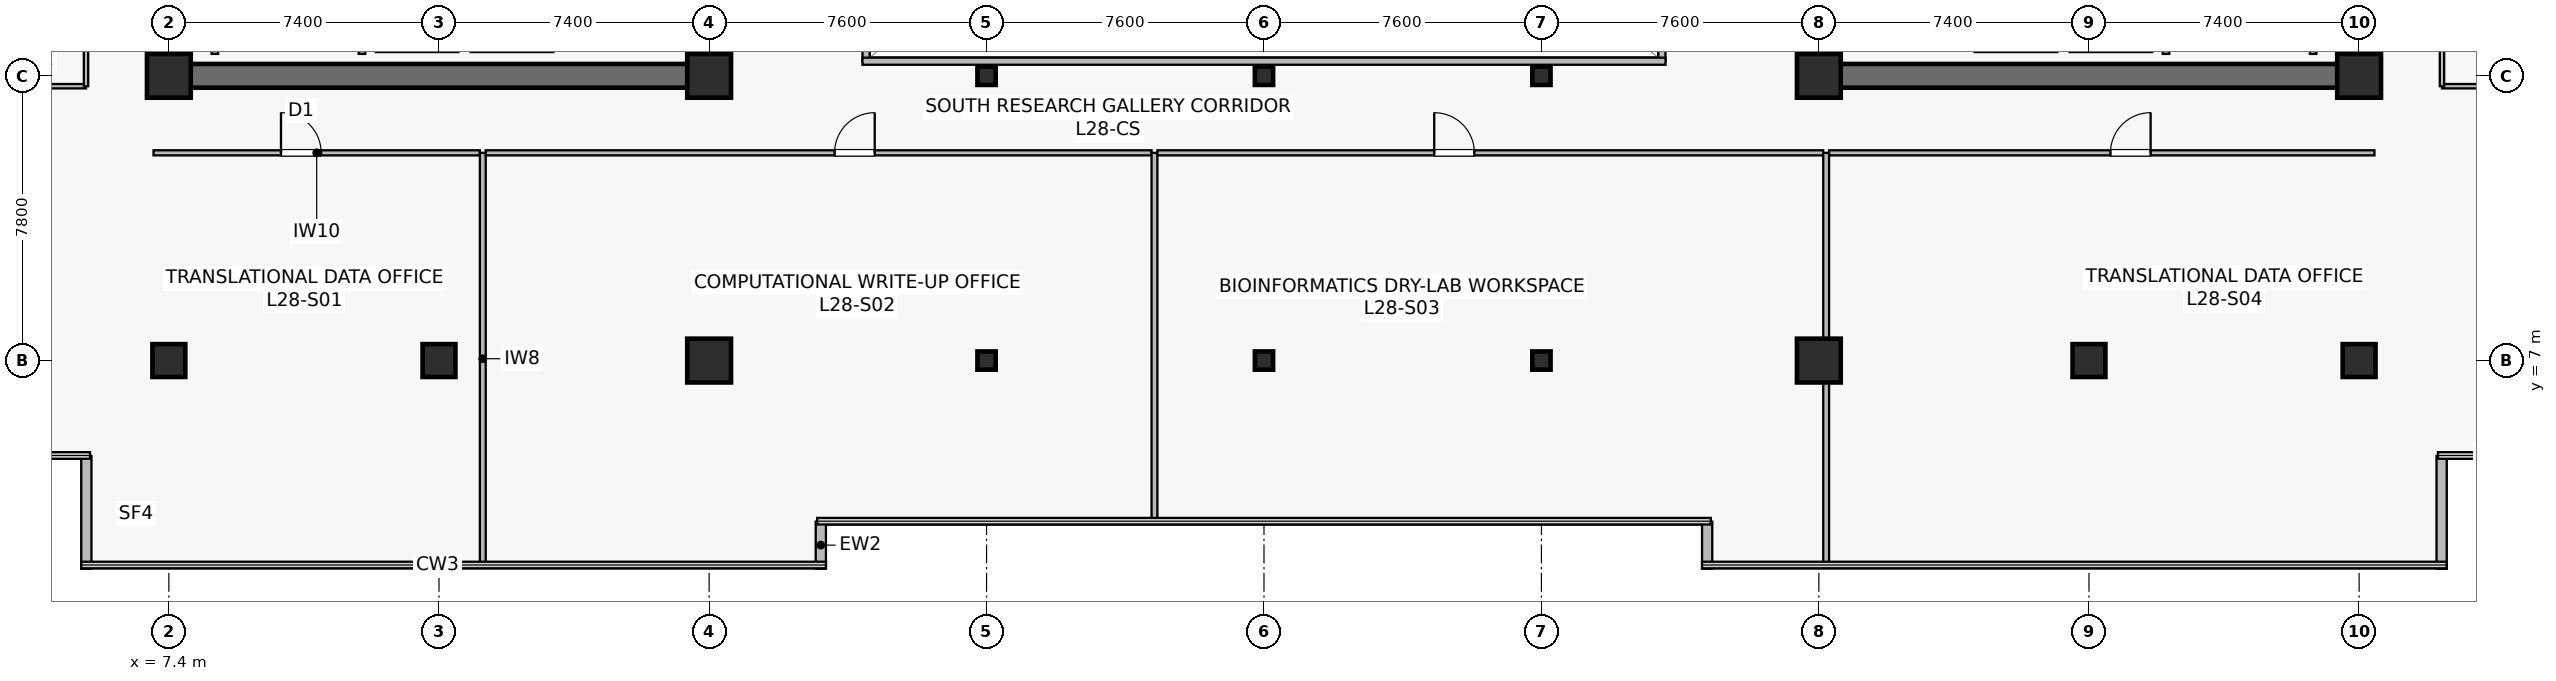
"""IFC4 building model, lengths in metres.
Left out: names, types, materials, properties, quantities, classifications, styles, units other than length and angle.
Written with IfcOpenShell. Run it as: python <this file> out.ifc"""

import sys

from ifc_helpers import new_model, si_unit, direction, frame, frame_2d, origin, origin_2d, place, context, subcontext, project, spatial, rectangle, hollow_rectangle, extrude, source, transform, mapped, element, fill, save


model = new_model("IFC4")
c1 = context("Model", 3, precision=1e-05, world=origin(), true_north=direction((0.0, 1.0)))
c2 = subcontext(c1, "Body", "Model", "MODEL_VIEW")
j1 = project(units=[si_unit("LENGTHUNIT", "METRE"), si_unit("PLANEANGLEUNIT", "RADIAN")], contexts=[c1])
p1 = place(None, origin())
s1 = spatial("IfcSite", under=j1, at=p1, CompositionType="ELEMENT")
p2 = place(p1, origin())
s2 = spatial("IfcBuilding", under=s1, at=p2, CompositionType="ELEMENT")
p3 = place(p2, frame((0.0, 0.0, 117.4)))
s3 = spatial("IfcBuildingStorey", under=s2, at=p3, CompositionType="ELEMENT", Elevation=117.4)
p4 = place(p3, frame((7.075, 14.8, 0.0), z_axis=(0.0, 0.0, 1.0), x_axis=(1.0, 0.0, 0.0)))
e1 = element("IfcWall", 1, at=p4, inside=s3, PredefinedType="SHEAR", context=c2, shape_type="SweptSolid", body=[
    extrude(rectangle(XDim=15.45, YDim=0.65, at=frame_2d((7.725, 0.0))), origin(), (0.0, 0.0, 1.0), 3.79),
])
p5 = place(p3, frame((7.4, 15.125, 0.0), z_axis=(0.0, 0.0, 1.0), x_axis=(0.0, 1.0, 0.0)))
e2 = element("IfcWall", 2, at=p5, inside=s3, PredefinedType="SHEAR", context=c2, shape_type="SweptSolid", body=[
    extrude(rectangle(XDim=18.35, YDim=0.65, at=frame_2d((9.175, 0.0))), origin(), (0.0, 0.0, 1.0), 3.79),
])
p6 = place(p3, frame((22.2, 15.125, 0.0), z_axis=(0.0, 0.0, 1.0), x_axis=(0.0, 1.0, 0.0)))
e3 = element("IfcWall", 3, at=p6, inside=s3, PredefinedType="SHEAR", context=c2, shape_type="SweptSolid", body=[
    extrude(rectangle(XDim=18.35, YDim=0.65, at=frame_2d((9.175, 0.0))), origin(), (0.0, 0.0, 1.0), 3.79),
])
p7 = place(p6, frame((3.425, 0.0, 0.0)))
e4 = element("IfcOpeningElement", 4, at=p7, cuts=e3, PredefinedType="OPENING", context=c2, shape_type="SweptSolid", body=[
    extrude(rectangle(XDim=1.42, YDim=2.2, at=frame_2d((0.71, 1.1))), frame((0.0, 0.335, 0.0), z_axis=(0.0, -1.0, 0.0), x_axis=(1.0, 0.0, 0.0)), (0.0, 0.0, 1.0), 0.67),
])
p8 = place(p3, frame((52.275, 14.8, 0.0), z_axis=(0.0, 0.0, 1.0), x_axis=(1.0, 0.0, 0.0)))
e5 = element("IfcWall", 5, at=p8, inside=s3, PredefinedType="SHEAR", context=c2, shape_type="SweptSolid", body=[
    extrude(rectangle(XDim=15.45, YDim=0.65, at=frame_2d((7.725, 0.0))), origin(), (0.0, 0.0, 1.0), 3.79),
])
p9 = place(p3, frame((52.6, 15.125, 0.0), z_axis=(0.0, 0.0, 1.0), x_axis=(0.0, 1.0, 0.0)))
e6 = element("IfcWall", 6, at=p9, inside=s3, PredefinedType="SHEAR", context=c2, shape_type="SweptSolid", body=[
    extrude(rectangle(XDim=18.35, YDim=0.65, at=frame_2d((9.175, 0.0))), origin(), (0.0, 0.0, 1.0), 3.79),
])
p10 = place(p9, frame((3.425, 0.0, 0.0)))
e7 = element("IfcOpeningElement", 7, at=p10, cuts=e6, PredefinedType="OPENING", context=c2, shape_type="SweptSolid", body=[
    extrude(rectangle(XDim=1.42, YDim=2.2, at=frame_2d((0.71, 1.1))), frame((0.0, 0.335, 0.0), z_axis=(0.0, -1.0, 0.0), x_axis=(1.0, 0.0, 0.0)), (0.0, 0.0, 1.0), 0.67),
])
p11 = place(p3, frame((67.4, 15.125, 0.0), z_axis=(0.0, 0.0, 1.0), x_axis=(0.0, 1.0, 0.0)))
e8 = element("IfcWall", 8, at=p11, inside=s3, PredefinedType="SHEAR", context=c2, shape_type="SweptSolid", body=[
    extrude(rectangle(XDim=18.35, YDim=0.65, at=frame_2d((9.175, 0.0))), origin(), (0.0, 0.0, 1.0), 3.79),
])
m1 = source(origin(), c2, "Body", "SweptSolid", [
    extrude(rectangle(XDim=0.9, YDim=0.9, at=origin_2d()), origin(), (0.0, 0.0, 1.0), 4.1),
])
p12 = place(p3, frame((14.8, 7.0, 0.0), z_axis=(0.0, 0.0, 1.0), x_axis=(1.0, 0.0, 0.0)))
e9 = element("IfcColumn", 9, at=p12, inside=s3, PredefinedType="COLUMN", context=c2, shape_type="MappedRepresentation", body=[
    mapped(m1, transform((0.0, 0.0, 0.0), scale=1.0)),
])
m2 = source(origin(), c2, "Body", "SweptSolid", [
    extrude(rectangle(XDim=1.2, YDim=1.2, at=origin_2d()), origin(), (0.0, 0.0, 1.0), 4.1),
])
for number, where, z_axis, x_axis in (
    (10, (22.2, 7.0, 0.0), (0.0, 0.0, 1.0), (1.0, 0.0, 0.0)),
    (11, (7.4, 14.8, 0.0), (0.0, 0.0, 1.0), (1.0, 0.0, 0.0)),
    (12, (22.2, 14.8, 0.0), (0.0, 0.0, 1.0), (1.0, 0.0, 0.0)),
    (13, (52.6, 7.0, 0.0), (0.0, 0.0, 1.0), (1.0, 0.0, 0.0)),
):
    element("IfcColumn", number, at=place(p3, frame(where, z_axis=z_axis, x_axis=x_axis)), inside=s3, PredefinedType="COLUMN", context=c2, shape_type="MappedRepresentation", body=[
        mapped(m2, transform((0.0, 0.0, 0.0), scale=1.0)),
    ])
p13 = place(p3, frame((60.0, 7.0, 0.0), z_axis=(0.0, 0.0, 1.0), x_axis=(1.0, 0.0, 0.0)))
e14 = element("IfcColumn", 14, at=p13, inside=s3, PredefinedType="COLUMN", context=c2, shape_type="MappedRepresentation", body=[
    mapped(m1, transform((0.0, 0.0, 0.0), scale=1.0)),
])
for number, where, z_axis, x_axis in (
    (15, (52.6, 14.8, 0.0), (0.0, 0.0, 1.0), (1.0, 0.0, 0.0)),
    (16, (67.4, 14.8, 0.0), (0.0, 0.0, 1.0), (1.0, 0.0, 0.0)),
):
    element("IfcColumn", number, at=place(p3, frame(where, z_axis=z_axis, x_axis=x_axis)), inside=s3, PredefinedType="COLUMN", context=c2, shape_type="MappedRepresentation", body=[
        mapped(m2, transform((0.0, 0.0, 0.0), scale=1.0)),
    ])
for number, where, z_axis, x_axis in (
    (17, (7.4, 7.0, 0.0), (0.0, 0.0, 1.0), (1.0, 0.0, 0.0)),
    (18, (67.4, 7.0, 0.0), (0.0, 0.0, 1.0), (1.0, 0.0, 0.0)),
):
    element("IfcColumn", number, at=place(p3, frame(where, z_axis=z_axis, x_axis=x_axis)), inside=s3, PredefinedType="COLUMN", context=c2, shape_type="MappedRepresentation", body=[
        mapped(m1, transform((0.0, 0.0, 0.0), scale=1.0)),
    ])
m3 = source(origin(), c2, "Body", "SweptSolid", [
    extrude(hollow_rectangle(XDim=0.5, YDim=0.5, WallThickness=0.022, at=origin_2d()), origin(), (0.0, 0.0, 1.0), 4.1),
])
for number, where, z_axis, x_axis in (
    (19, (29.8, 7.0, 0.0), (0.0, 0.0, 1.0), (1.0, 0.0, 0.0)),
    (20, (29.8, 14.8, 0.0), (0.0, 0.0, 1.0), (1.0, 0.0, 0.0)),
    (21, (37.4, 7.0, 0.0), (0.0, 0.0, 1.0), (1.0, 0.0, 0.0)),
    (22, (37.4, 14.8, 0.0), (0.0, 0.0, 1.0), (1.0, 0.0, 0.0)),
    (23, (45.0, 7.0, 0.0), (0.0, 0.0, 1.0), (1.0, 0.0, 0.0)),
    (24, (45.0, 14.8, 0.0), (0.0, 0.0, 1.0), (1.0, 0.0, 0.0)),
):
    element("IfcColumn", number, at=place(p3, frame(where, z_axis=z_axis, x_axis=x_axis)), inside=s3, PredefinedType="COLUMN", context=c2, shape_type="MappedRepresentation", body=[
        mapped(m3, transform((0.0, 0.0, 0.0), scale=1.0)),
    ])
for number, where, z_axis, x_axis in (
    (25, (25.26, 1.3, 0.0), (0.0, 0.0, 1.0), (0.0, 1.0, 0.0)),
    (26, (49.54, 2.588, 0.0), (0.0, 0.0, 1.0), (0.0, -1.0, 0.0)),
):
    element("IfcWall", number, at=place(p3, frame(where, z_axis=z_axis, x_axis=x_axis)), inside=s3, PredefinedType="STANDARD", context=c2, shape_type="SweptSolid", body=[
        extrude(rectangle(XDim=1.288, YDim=0.28, at=frame_2d((0.644, 0.0))), origin(), (0.0, 0.0, 1.0), 3.79),
    ])
for number, where, z_axis, x_axis in (
    (27, (69.66, 1.3, 0.0), (0.0, 0.0, 1.0), (0.0, 1.0, 0.0)),
    (28, (5.14, 4.388, 0.0), (0.0, 0.0, 1.0), (0.0, -1.0, 0.0)),
):
    element("IfcWall", number, at=place(p3, frame(where, z_axis=z_axis, x_axis=x_axis)), inside=s3, PredefinedType="STANDARD", context=c2, shape_type="SweptSolid", body=[
        extrude(rectangle(XDim=3.088, YDim=0.28, at=frame_2d((1.544, 0.0))), origin(), (0.0, 0.0, 1.0), 3.79),
    ])
p14 = place(p3, frame((13.07, 15.55, 0.0), z_axis=(0.0, 0.0, 1.0), x_axis=(1.0, 0.0, 0.0)))
e29 = element("IfcWall", 29, at=p14, inside=s3, PredefinedType="SOLIDWALL", context=c2, shape_type="SweptSolid", body=[
    extrude(rectangle(XDim=2.26, YDim=0.2, at=frame_2d((1.13, 0.0))), origin(), (0.0, 0.0, 1.0), 3.125),
])
p15 = place(p3, frame((15.67, 15.55, 0.0), z_axis=(0.0, 0.0, 1.0), x_axis=(1.0, 0.0, 0.0)))
e30 = element("IfcWall", 30, at=p15, inside=s3, PredefinedType="SOLIDWALL", context=c2, shape_type="SweptSolid", body=[
    extrude(rectangle(XDim=2.26, YDim=0.2, at=frame_2d((1.13, 0.0))), origin(), (0.0, 0.0, 1.0), 3.79),
])
for number, where, z_axis, x_axis in (
    (31, (12.69, 15.4, 0.0), (0.0, 0.0, 1.0), (0.0, 1.0, 0.0)),
    (32, (8.66, 15.4, 0.0), (0.0, 0.0, 1.0), (0.0, 1.0, 0.0)),
):
    element("IfcWall", number, at=place(p3, frame(where, z_axis=z_axis, x_axis=x_axis)), inside=s3, PredefinedType="SOLIDWALL", context=c2, shape_type="SweptSolid", body=[
        extrude(rectangle(XDim=2.4, YDim=0.18, at=frame_2d((1.2, 0.0))), origin(), (0.0, 0.0, 1.0), 3.79),
    ])
p16 = place(p3, frame((59.47, 15.55, 0.0), z_axis=(0.0, 0.0, 1.0), x_axis=(1.0, 0.0, 0.0)))
e33 = element("IfcWall", 33, at=p16, inside=s3, PredefinedType="SOLIDWALL", context=c2, shape_type="SweptSolid", body=[
    extrude(rectangle(XDim=2.26, YDim=0.2, at=frame_2d((1.13, 0.0))), origin(), (0.0, 0.0, 1.0), 3.125),
])
p17 = place(p3, frame((56.87, 15.55, 0.0), z_axis=(0.0, 0.0, 1.0), x_axis=(1.0, 0.0, 0.0)))
e34 = element("IfcWall", 34, at=p17, inside=s3, PredefinedType="SOLIDWALL", context=c2, shape_type="SweptSolid", body=[
    extrude(rectangle(XDim=2.26, YDim=0.2, at=frame_2d((1.13, 0.0))), origin(), (0.0, 0.0, 1.0), 3.79),
])
for number, where, z_axis, x_axis in (
    (35, (62.11, 15.4, 0.0), (0.0, 0.0, 1.0), (0.0, 1.0, 0.0)),
    (36, (66.14, 15.4, 0.0), (0.0, 0.0, 1.0), (0.0, 1.0, 0.0)),
):
    element("IfcWall", number, at=place(p3, frame(where, z_axis=z_axis, x_axis=x_axis)), inside=s3, PredefinedType="SOLIDWALL", context=c2, shape_type="SweptSolid", body=[
        extrude(rectangle(XDim=2.4, YDim=0.18, at=frame_2d((1.2, 0.0))), origin(), (0.0, 0.0, 1.0), 3.79),
    ])
p18 = place(p3, frame((26.5, 15.2, 0.0), z_axis=(0.0, 0.0, 1.0), x_axis=(0.0, 1.0, 0.0)))
e37 = element("IfcWall", 37, at=p18, inside=s3, PredefinedType="SOLIDWALL", context=c2, shape_type="SweptSolid", body=[
    extrude(rectangle(XDim=18.2, YDim=0.195, at=frame_2d((9.1, 0.0))), origin(), (0.0, 0.0, 1.0), 3.79),
])
p19 = place(p18, frame((1.8, 0.0, 0.9)))
e38 = element("IfcOpeningElement", 38, at=p19, cuts=e37, PredefinedType="OPENING", context=c2, shape_type="SweptSolid", body=[
    extrude(rectangle(XDim=1.5, YDim=1.4, at=frame_2d((0.75, 0.7))), frame((0.0, 0.107, 0.0), z_axis=(0.0, -1.0, 0.0), x_axis=(1.0, 0.0, 0.0)), (0.0, 0.0, 1.0), 0.215),
])
p20 = place(p18, frame((13.2, 0.0, 0.9)))
e39 = element("IfcOpeningElement", 39, at=p20, cuts=e37, PredefinedType="OPENING", context=c2, shape_type="SweptSolid", body=[
    extrude(rectangle(XDim=1.5, YDim=1.4, at=frame_2d((0.75, 0.7))), frame((0.0, 0.107, 0.0), z_axis=(0.0, -1.0, 0.0), x_axis=(1.0, 0.0, 0.0)), (0.0, 0.0, 1.0), 0.215),
])
p21 = place(p3, frame((48.3, 15.2, 0.0), z_axis=(0.0, 0.0, 1.0), x_axis=(0.0, 1.0, 0.0)))
e40 = element("IfcWall", 40, at=p21, inside=s3, PredefinedType="SOLIDWALL", context=c2, shape_type="SweptSolid", body=[
    extrude(rectangle(XDim=18.2, YDim=0.195, at=frame_2d((9.1, 0.0))), origin(), (0.0, 0.0, 1.0), 3.79),
])
p22 = place(p21, frame((1.8, 0.0, 0.9)))
e41 = element("IfcOpeningElement", 41, at=p22, cuts=e40, PredefinedType="OPENING", context=c2, shape_type="SweptSolid", body=[
    extrude(rectangle(XDim=1.5, YDim=1.4, at=frame_2d((0.75, 0.7))), frame((0.0, 0.107, 0.0), z_axis=(0.0, -1.0, 0.0), x_axis=(1.0, 0.0, 0.0)), (0.0, 0.0, 1.0), 0.215),
])
p23 = place(p21, frame((13.2, 0.0, 0.9)))
e42 = element("IfcOpeningElement", 42, at=p23, cuts=e40, PredefinedType="OPENING", context=c2, shape_type="SweptSolid", body=[
    extrude(rectangle(XDim=1.5, YDim=1.4, at=frame_2d((0.75, 0.7))), frame((0.0, 0.107, 0.0), z_axis=(0.0, -1.0, 0.0), x_axis=(1.0, 0.0, 0.0)), (0.0, 0.0, 1.0), 0.215),
])
p24 = place(p3, frame((26.4, 15.2, 0.0), z_axis=(0.0, 0.0, 1.0), x_axis=(1.0, 0.0, 0.0)))
e43 = element("IfcWall", 43, at=p24, inside=s3, PredefinedType="SOLIDWALL", context=c2, shape_type="SweptSolid", body=[
    extrude(rectangle(XDim=22.0, YDim=0.195, at=frame_2d((11.0, 0.0))), origin(), (0.0, 0.0, 1.0), 3.79),
])
p25 = place(p3, frame((6.98, 12.69, 0.0), z_axis=(0.0, 0.0, 1.0), x_axis=(1.0, 0.0, 0.0)))
e44 = element("IfcWall", 44, at=p25, inside=s3, PredefinedType="PARTITIONING", context=c2, shape_type="SweptSolid", body=[
    extrude(rectangle(XDim=8.94, YDim=0.14, at=frame_2d((4.47, 0.0))), origin(), (0.0, 0.0, 1.0), 3.125),
])
p26 = place(p25, frame((3.492, 0.0, 0.0)))
e45 = element("IfcOpeningElement", 45, at=p26, cuts=e44, PredefinedType="OPENING", context=c2, shape_type="SweptSolid", body=[
    extrude(rectangle(XDim=1.1, YDim=2.18, at=frame_2d((0.55, 1.09))), frame((0.0, 0.08, 0.0), z_axis=(0.0, -1.0, 0.0), x_axis=(1.0, 0.0, 0.0)), (0.0, 0.0, 1.0), 0.16),
])
p27 = place(p3, frame((16.0, 1.41, 0.0), z_axis=(0.0, 0.0, 1.0), x_axis=(0.0, 1.0, 0.0)))
e46 = element("IfcWall", 46, at=p27, inside=s3, PredefinedType="PARTITIONING", context=c2, shape_type="SweptSolid", body=[
    extrude(rectangle(XDim=11.28, YDim=0.16, at=frame_2d((5.64, 0.0))), origin(), (0.0, 0.0, 1.0), 3.075),
])
p28 = place(p3, frame((16.08, 12.69, 0.0), z_axis=(0.0, 0.0, 1.0), x_axis=(1.0, 0.0, 0.0)))
e47 = element("IfcWall", 47, at=p28, inside=s3, PredefinedType="PARTITIONING", context=c2, shape_type="SweptSolid", body=[
    extrude(rectangle(XDim=18.24, YDim=0.14, at=frame_2d((9.12, 0.0))), origin(), (0.0, 0.0, 1.0), 3.125),
])
p29 = place(p28, frame((9.556, 0.0, 0.0)))
e48 = element("IfcOpeningElement", 48, at=p29, cuts=e47, PredefinedType="OPENING", context=c2, shape_type="SweptSolid", body=[
    extrude(rectangle(XDim=1.1, YDim=2.18, at=frame_2d((0.55, 1.09))), frame((0.0, 0.08, 0.0), z_axis=(0.0, -1.0, 0.0), x_axis=(1.0, 0.0, 0.0)), (0.0, 0.0, 1.0), 0.16),
])
p30 = place(p3, frame((34.4, 2.61, 0.0), z_axis=(0.0, 0.0, 1.0), x_axis=(0.0, 1.0, 0.0)))
e49 = element("IfcWall", 49, at=p30, inside=s3, PredefinedType="PARTITIONING", context=c2, shape_type="SweptSolid", body=[
    extrude(rectangle(XDim=10.08, YDim=0.16, at=frame_2d((5.04, 0.0))), origin(), (0.0, 0.0, 1.0), 3.075),
])
p31 = place(p3, frame((34.48, 12.69, 0.0), z_axis=(0.0, 0.0, 1.0), x_axis=(1.0, 0.0, 0.0)))
e50 = element("IfcWall", 50, at=p31, inside=s3, PredefinedType="PARTITIONING", context=c2, shape_type="SweptSolid", body=[
    extrude(rectangle(XDim=18.24, YDim=0.14, at=frame_2d((9.12, 0.0))), origin(), (0.0, 0.0, 1.0), 3.125),
])
p32 = place(p31, frame((7.583, 0.0, 0.0)))
e51 = element("IfcOpeningElement", 51, at=p32, cuts=e50, PredefinedType="OPENING", context=c2, shape_type="SweptSolid", body=[
    extrude(rectangle(XDim=1.1, YDim=2.18, at=frame_2d((0.55, 1.09))), frame((0.0, 0.08, 0.0), z_axis=(0.0, -1.0, 0.0), x_axis=(1.0, 0.0, 0.0)), (0.0, 0.0, 1.0), 0.16),
])
p33 = place(p3, frame((52.8, 1.41, 0.0), z_axis=(0.0, 0.0, 1.0), x_axis=(0.0, 1.0, 0.0)))
e52 = element("IfcWall", 52, at=p33, inside=s3, PredefinedType="PARTITIONING", context=c2, shape_type="SweptSolid", body=[
    extrude(rectangle(XDim=11.28, YDim=0.16, at=frame_2d((5.64, 0.0))), origin(), (0.0, 0.0, 1.0), 3.075),
])
p34 = place(p3, frame((52.88, 12.69, 0.0), z_axis=(0.0, 0.0, 1.0), x_axis=(1.0, 0.0, 0.0)))
e53 = element("IfcWall", 53, at=p34, inside=s3, PredefinedType="PARTITIONING", context=c2, shape_type="SweptSolid", body=[
    extrude(rectangle(XDim=14.94, YDim=0.14, at=frame_2d((7.47, 0.0))), origin(), (0.0, 0.0, 1.0), 3.125),
])
p35 = place(p34, frame((7.708, 0.0, 0.0)))
e54 = element("IfcOpeningElement", 54, at=p35, cuts=e53, PredefinedType="OPENING", context=c2, shape_type="SweptSolid", body=[
    extrude(rectangle(XDim=1.1, YDim=2.18, at=frame_2d((0.55, 1.09))), frame((0.0, 0.08, 0.0), z_axis=(0.0, -1.0, 0.0), x_axis=(1.0, 0.0, 0.0)), (0.0, 0.0, 1.0), 0.16),
])
p36 = place(p3, frame((2.11, 14.515, 0.0), z_axis=(0.0, 0.0, 1.0), x_axis=(1.0, 0.0, 0.0)))
e55 = element("IfcWall", 55, at=p36, inside=s3, PredefinedType="PARTITIONING", context=c2, shape_type="SweptSolid", body=[
    extrude(rectangle(XDim=3.02, YDim=0.12, at=frame_2d((1.51, 0.0))), origin(), (0.0, 0.0, 1.0), 3.79),
])
p37 = place(p3, frame((5.13, 14.515, 0.0), z_axis=(0.0, 0.0, 1.0), x_axis=(0.0, 1.0, 0.0)))
e56 = element("IfcWall", 56, at=p37, inside=s3, PredefinedType="PARTITIONING", context=c2, shape_type="SweptSolid", body=[
    extrude(rectangle(XDim=19.57, YDim=0.12, at=frame_2d((9.785, 0.0))), origin(), (0.0, 0.0, 1.0), 3.79),
])
p38 = place(p37, frame((9.335, 0.0, 0.0)))
e57 = element("IfcOpeningElement", 57, at=p38, cuts=e56, PredefinedType="OPENING", context=c2, shape_type="SweptSolid", body=[
    extrude(rectangle(XDim=0.9, YDim=2.1, at=frame_2d((0.45, 1.05))), frame((0.0, 0.07, 0.0), z_axis=(0.0, -1.0, 0.0), x_axis=(1.0, 0.0, 0.0)), (0.0, 0.0, 1.0), 0.14),
])
p39 = place(p3, frame((69.67, 14.515, 0.0), z_axis=(0.0, 0.0, 1.0), x_axis=(1.0, 0.0, 0.0)))
e58 = element("IfcWall", 58, at=p39, inside=s3, PredefinedType="PARTITIONING", context=c2, shape_type="SweptSolid", body=[
    extrude(rectangle(XDim=3.02, YDim=0.12, at=frame_2d((1.51, 0.0))), origin(), (0.0, 0.0, 1.0), 3.79),
])
p40 = place(p3, frame((69.67, 14.515, 0.0), z_axis=(0.0, 0.0, 1.0), x_axis=(0.0, 1.0, 0.0)))
e59 = element("IfcWall", 59, at=p40, inside=s3, PredefinedType="PARTITIONING", context=c2, shape_type="SweptSolid", body=[
    extrude(rectangle(XDim=6.025, YDim=0.12, at=frame_2d((3.013, 0.0))), origin(), (0.0, 0.0, 1.0), 3.79),
])
p41 = place(p40, frame((2.562, 0.0, 0.0)))
e60 = element("IfcOpeningElement", 60, at=p41, cuts=e59, PredefinedType="OPENING", context=c2, shape_type="SweptSolid", body=[
    extrude(rectangle(XDim=0.9, YDim=2.1, at=frame_2d((0.45, 1.05))), frame((0.0, 0.07, 0.0), z_axis=(0.0, -1.0, 0.0), x_axis=(1.0, 0.0, 0.0)), (0.0, 0.0, 1.0), 0.14),
])
m4 = source(origin(), c2, "Body", "SweptSolid", [
    extrude(rectangle(XDim=1.1, YDim=2.18, at=frame_2d((0.55, 1.09))), frame((0.0, 0.025, 0.0), z_axis=(0.0, -1.0, 0.0), x_axis=(1.0, 0.0, 0.0)), (0.0, 0.0, 1.0), 0.05),
])
p42 = place(p26, origin())
e61 = element("IfcDoor", 61, at=p42, inside=s3, OperationType="SINGLE_SWING_LEFT", PredefinedType="DOOR", context=c2, shape_type="MappedRepresentation", body=[
    mapped(m4, transform((0.0, 0.0, 0.0), scale=1.0)),
])
fill(e45, e61)
p43 = place(p29, origin())
e62 = element("IfcDoor", 62, at=p43, inside=s3, OperationType="SINGLE_SWING_RIGHT", PredefinedType="DOOR", context=c2, shape_type="MappedRepresentation", body=[
    mapped(m4, transform((0.0, 0.0, 0.0), scale=1.0)),
])
fill(e48, e62)
p44 = place(p32, origin())
e63 = element("IfcDoor", 63, at=p44, inside=s3, OperationType="SINGLE_SWING_LEFT", PredefinedType="DOOR", context=c2, shape_type="MappedRepresentation", body=[
    mapped(m4, transform((0.0, 0.0, 0.0), scale=1.0)),
])
fill(e51, e63)
p45 = place(p35, origin())
e64 = element("IfcDoor", 64, at=p45, inside=s3, OperationType="SINGLE_SWING_RIGHT", PredefinedType="DOOR", context=c2, shape_type="MappedRepresentation", body=[
    mapped(m4, transform((0.0, 0.0, 0.0), scale=1.0)),
])
fill(e54, e64)
save(model, sys.argv[1])
